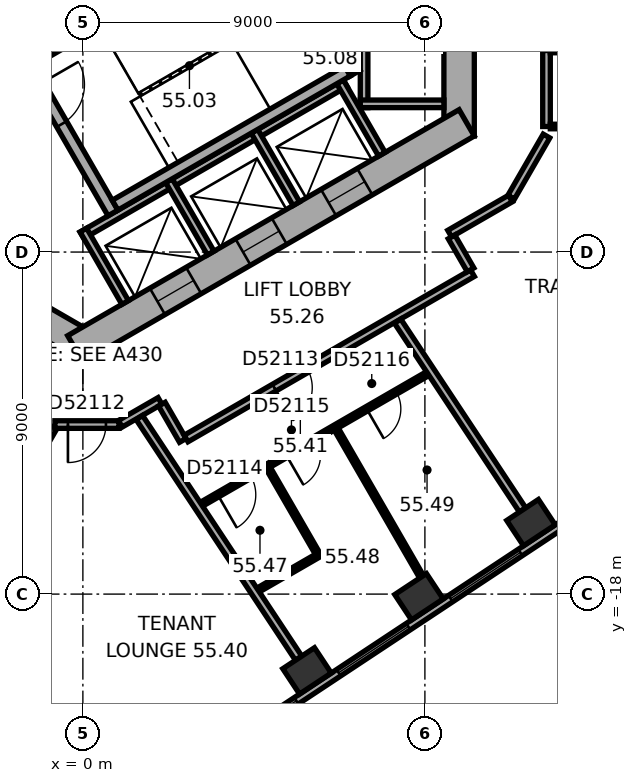
"""IFC4 building model, lengths in metres.
Left out: names, types, materials, properties, quantities, classifications, styles, units other than length and angle.
Written with IfcOpenShell. Run it as: python <this file> out.ifc"""

import sys

from ifc_helpers import new_model, si_unit, direction, frame, frame_2d, origin, origin_2d, place, context, subcontext, project, spatial, rectangle, extrude, element, fill, save


model = new_model("IFC4")
c1 = context("Model", 3, precision=1e-05, world=origin(), true_north=direction((0.0, 1.0)))
c2 = subcontext(c1, "Body", "Model", "MODEL_VIEW")
j1 = project(units=[si_unit("LENGTHUNIT", "METRE"), si_unit("PLANEANGLEUNIT", "RADIAN")], contexts=[c1])
p1 = place(None, origin())
s1 = spatial("IfcSite", under=j1, at=p1, CompositionType="ELEMENT")
p2 = place(p1, origin())
s2 = spatial("IfcBuilding", under=s1, at=p2, CompositionType="ELEMENT")
p3 = place(p2, frame((0.0, 0.0, 225.4)))
s3 = spatial("IfcBuildingStorey", under=s2, at=p3, CompositionType="ELEMENT", Elevation=225.4)
for number, where, z_axis, x_axis in (
    (1, (5.898, -20.021, 0.0), (0.0, 0.0, 1.0), (0.834, 0.552, 0.0)),
    (2, (8.844, -18.07, 0.0), (0.0, 0.0, 1.0), (0.834, 0.552, 0.0)),
    (3, (11.791, -16.12, 0.0), (0.0, 0.0, 1.0), (0.834, 0.552, 0.0)),
):
    element("IfcColumn", number, at=place(p3, frame(where, z_axis=z_axis, x_axis=x_axis)), inside=s3, PredefinedType="COLUMN", context=c2, shape_type="SweptSolid", body=[
        extrude(rectangle(XDim=1.0, YDim=0.8, at=origin_2d()), origin(), (0.0, 0.0, 1.0), 3.7),
    ])
p4 = place(p3, frame((9.9, -5.947, 0.0), z_axis=(0.0, 0.0, 1.0), x_axis=(0.0, 1.0, 0.0)))
e4 = element("IfcWall", 4, at=p4, inside=s3, PredefinedType="SHEAR", context=c2, shape_type="SweptSolid", body=[
    extrude(rectangle(XDim=11.894, YDim=0.8, at=frame_2d((5.947, 0.0))), origin(), (0.0, 0.0, 1.0), 3.7),
])
p5 = place(p4, frame((6.147, 0.0, 0.0)))
e5 = element("IfcOpeningElement", 5, at=p5, cuts=e4, PredefinedType="OPENING", context=c2, shape_type="SweptSolid", body=[
    extrude(rectangle(XDim=1.5, YDim=2.1, at=frame_2d((0.75, 1.05))), frame((0.0, 0.41, 0.0), z_axis=(0.0, -1.0, 0.0), x_axis=(1.0, 0.0, 0.0)), (0.0, 0.0, 1.0), 0.82),
])
p6 = place(p4, frame((2.997, 0.0, 0.0)))
e6 = element("IfcOpeningElement", 6, at=p6, cuts=e4, PredefinedType="OPENING", context=c2, shape_type="SweptSolid", body=[
    extrude(rectangle(XDim=0.9, YDim=2.1, at=frame_2d((0.45, 1.05))), frame((0.0, 0.41, 0.0), z_axis=(0.0, -1.0, 0.0), x_axis=(1.0, 0.0, 0.0)), (0.0, 0.0, 1.0), 0.82),
])
p7 = place(p3, frame((-10.1, -5.6, 0.0), z_axis=(0.0, 0.0, 1.0), x_axis=(0.866023897231, -0.500002609418, 0.0)))
e7 = element("IfcWall", 7, at=p7, inside=s3, PredefinedType="SHEAR", context=c2, shape_type="SweptSolid", body=[
    extrude(rectangle(XDim=11.894, YDim=0.8, at=frame_2d((5.947, 0.0))), origin(), (0.0, 0.0, 1.0), 3.7),
])
p8 = place(p7, frame((6.147, 0.0, 0.0)))
e8 = element("IfcOpeningElement", 8, at=p8, cuts=e7, PredefinedType="OPENING", context=c2, shape_type="SweptSolid", body=[
    extrude(rectangle(XDim=1.5, YDim=2.1, at=frame_2d((0.75, 1.05))), frame((0.0, 0.41, 0.0), z_axis=(0.0, -1.0, 0.0), x_axis=(1.0, 0.0, 0.0)), (0.0, 0.0, 1.0), 0.82),
])
p9 = place(p7, frame((1.597, 0.0, 0.0)))
e9 = element("IfcOpeningElement", 9, at=p9, cuts=e7, PredefinedType="OPENING", context=c2, shape_type="SweptSolid", body=[
    extrude(rectangle(XDim=1.1, YDim=2.1, at=frame_2d((0.55, 1.05))), frame((0.0, 0.41, 0.0), z_axis=(0.0, -1.0, 0.0), x_axis=(1.0, 0.0, 0.0)), (0.0, 0.0, 1.0), 0.82),
])
p10 = place(p7, frame((4.197, 0.0, 0.0)))
e10 = element("IfcOpeningElement", 10, at=p10, cuts=e7, PredefinedType="OPENING", context=c2, shape_type="SweptSolid", body=[
    extrude(rectangle(XDim=1.1, YDim=2.1, at=frame_2d((0.55, 1.05))), frame((0.0, 0.41, 0.0), z_axis=(0.0, -1.0, 0.0), x_axis=(1.0, 0.0, 0.0)), (0.0, 0.0, 1.0), 0.82),
])
p11 = place(p3, frame((-0.2, -11.547, 0.0), z_axis=(0.0, 0.0, 1.0), x_axis=(0.866023897231, 0.500002609418, 0.0)))
e11 = element("IfcWall", 11, at=p11, inside=s3, PredefinedType="SHEAR", context=c2, shape_type="SweptSolid", body=[
    extrude(rectangle(XDim=11.894, YDim=0.8, at=frame_2d((5.947, 0.0))), origin(), (0.0, 0.0, 1.0), 3.7),
])
p12 = place(p11, frame((2.497, 0.0, 0.0)))
e12 = element("IfcOpeningElement", 12, at=p12, cuts=e11, PredefinedType="OPENING", context=c2, shape_type="SweptSolid", body=[
    extrude(rectangle(XDim=1.1, YDim=2.1, at=frame_2d((0.55, 1.05))), frame((0.0, 0.41, 0.0), z_axis=(0.0, -1.0, 0.0), x_axis=(1.0, 0.0, 0.0)), (0.0, 0.0, 1.0), 0.82),
])
p13 = place(p11, frame((5.097, 0.0, 0.0)))
e13 = element("IfcOpeningElement", 13, at=p13, cuts=e11, PredefinedType="OPENING", context=c2, shape_type="SweptSolid", body=[
    extrude(rectangle(XDim=1.1, YDim=2.1, at=frame_2d((0.55, 1.05))), frame((0.0, 0.41, 0.0), z_axis=(0.0, -1.0, 0.0), x_axis=(1.0, 0.0, 0.0)), (0.0, 0.0, 1.0), 0.82),
])
p14 = place(p11, frame((7.697, 0.0, 0.0)))
e14 = element("IfcOpeningElement", 14, at=p14, cuts=e11, PredefinedType="OPENING", context=c2, shape_type="SweptSolid", body=[
    extrude(rectangle(XDim=1.1, YDim=2.1, at=frame_2d((0.55, 1.05))), frame((0.0, 0.41, 0.0), z_axis=(0.0, -1.0, 0.0), x_axis=(1.0, 0.0, 0.0)), (0.0, 0.0, 1.0), 0.82),
])
p15 = place(p3, frame((2.739, -22.711, 0.0), z_axis=(0.0, 0.0, 1.0), x_axis=(0.833885723098, 0.551937134838, 0.0)))
e15 = element("IfcWall", 15, at=p15, inside=s3, PredefinedType="STANDARD", context=c2, shape_type="SweptSolid", body=[
    extrude(rectangle(XDim=18.841, YDim=0.2, at=frame_2d((9.421, 0.0))), origin(), (0.0, 0.0, 1.0), 3.7),
])
p16 = place(p15, frame((1.252, 0.0, 0.9)))
e16 = element("IfcOpeningElement", 16, at=p16, cuts=e15, PredefinedType="OPENING", context=c2, shape_type="SweptSolid", body=[
    extrude(rectangle(XDim=2.2, YDim=2.0, at=frame_2d((1.1, 1.0))), frame((0.0, 0.11, 0.0), z_axis=(0.0, -1.0, 0.0), x_axis=(1.0, 0.0, 0.0)), (0.0, 0.0, 1.0), 0.22),
])
p17 = place(p15, frame((4.786, 0.0, 0.9)))
e17 = element("IfcOpeningElement", 17, at=p17, cuts=e15, PredefinedType="OPENING", context=c2, shape_type="SweptSolid", body=[
    extrude(rectangle(XDim=2.2, YDim=2.0, at=frame_2d((1.1, 1.0))), frame((0.0, 0.11, 0.0), z_axis=(0.0, -1.0, 0.0), x_axis=(1.0, 0.0, 0.0)), (0.0, 0.0, 1.0), 0.22),
])
p18 = place(p15, frame((8.32, 0.0, 0.9)))
e18 = element("IfcOpeningElement", 18, at=p18, cuts=e15, PredefinedType="OPENING", context=c2, shape_type="SweptSolid", body=[
    extrude(rectangle(XDim=2.2, YDim=2.0, at=frame_2d((1.1, 1.0))), frame((0.0, 0.11, 0.0), z_axis=(0.0, -1.0, 0.0), x_axis=(1.0, 0.0, 0.0)), (0.0, 0.0, 1.0), 0.22),
])
p19 = place(p15, frame((11.854, 0.0, 0.9)))
e19 = element("IfcOpeningElement", 19, at=p19, cuts=e15, PredefinedType="OPENING", context=c2, shape_type="SweptSolid", body=[
    extrude(rectangle(XDim=2.2, YDim=2.0, at=frame_2d((1.1, 1.0))), frame((0.0, 0.11, 0.0), z_axis=(0.0, -1.0, 0.0), x_axis=(1.0, 0.0, 0.0)), (0.0, 0.0, 1.0), 0.22),
])
p20 = place(p15, frame((15.387, 0.0, 0.9)))
e20 = element("IfcOpeningElement", 20, at=p20, cuts=e15, PredefinedType="OPENING", context=c2, shape_type="SweptSolid", body=[
    extrude(rectangle(XDim=2.2, YDim=2.0, at=frame_2d((1.1, 1.0))), frame((0.0, 0.11, 0.0), z_axis=(0.0, -1.0, 0.0), x_axis=(1.0, 0.0, 0.0)), (0.0, 0.0, 1.0), 0.22),
])
p21 = place(p3, frame((7.4, -5.2, 0.0), z_axis=(0.0, 0.0, 1.0), x_axis=(0.0, 1.0, 0.0)))
e21 = element("IfcWall", 21, at=p21, inside=s3, PredefinedType="PARTITIONING", context=c2, shape_type="SweptSolid", body=[
    extrude(rectangle(XDim=5.4, YDim=0.2, at=frame_2d((2.7, 0.0))), origin(), (0.0, 0.0, 1.0), 3.42),
])
p22 = place(p3, frame((7.3, -5.1, 0.0), z_axis=(0.0, 0.0, 1.0), x_axis=(1.0, 0.0, 0.0)))
e22 = element("IfcWall", 22, at=p22, inside=s3, PredefinedType="PARTITIONING", context=c2, shape_type="SweptSolid", body=[
    extrude(rectangle(XDim=2.2, YDim=0.2, at=frame_2d((1.1, 0.0))), origin(), (0.0, 0.0, 1.0), 3.42),
])
p23 = place(p3, frame((-0.024, -8.559, 0.0), z_axis=(0.0, 0.0, 1.0), x_axis=(0.866026010844, 0.49999894854, 0.0)))
e23 = element("IfcWall", 23, at=p23, inside=s3, PredefinedType="PARTITIONING", context=c2, shape_type="SweptSolid", body=[
    extrude(rectangle(XDim=8.0, YDim=0.2, at=frame_2d((4.0, 0.0))), origin(), (0.0, 0.0, 1.0), 3.42),
])
for number, where, z_axis, x_axis in (
    (24, (0.013, -8.422, 0.0), (0.0, 0.0, 1.0), (0.5, -0.866, 0.0)),
    (25, (2.264, -7.122, 0.0), (0.0, 0.0, 1.0), (0.5, -0.866, 0.0)),
    (26, (4.516, -5.822, 0.0), (0.0, 0.0, 1.0), (0.5, -0.866, 0.0)),
    (27, (6.768, -4.522, 0.0), (0.0, 0.0, 1.0), (0.5, -0.866, 0.0)),
):
    element("IfcWall", number, at=place(p3, frame(where, z_axis=z_axis, x_axis=x_axis)), inside=s3, PredefinedType="PARTITIONING", context=c2, shape_type="SweptSolid", body=[
        extrude(rectangle(XDim=2.2, YDim=0.2, at=frame_2d((1.1, 0.0))), origin(), (0.0, 0.0, 1.0), 3.42),
    ])
p24 = place(p3, frame((-1.558, -3.902, 0.0), z_axis=(0.0, 0.0, 1.0), x_axis=(0.499977259774, -0.866038532462, 0.0)))
e28 = element("IfcWall", 28, at=p24, inside=s3, PredefinedType="SHEAR", context=c2, shape_type="SweptSolid", body=[
    extrude(rectangle(XDim=4.7, YDim=0.3, at=frame_2d((2.35, 0.0))), origin(), (0.0, 0.0, 1.0), 3.42),
])
p25 = place(p24, frame((0.8, 0.0, 0.0)))
e29 = element("IfcOpeningElement", 29, at=p25, cuts=e28, PredefinedType="OPENING", context=c2, shape_type="SweptSolid", body=[
    extrude(rectangle(XDim=1.2, YDim=2.1, at=frame_2d((0.6, 1.05))), frame((0.0, 0.16, 0.0), z_axis=(0.0, -1.0, 0.0), x_axis=(1.0, 0.0, 0.0)), (0.0, 0.0, 1.0), 0.32),
])
p26 = place(p3, frame((4.816, -0.222, 0.0), z_axis=(0.0, 0.0, 1.0), x_axis=(0.499977259774, -0.866038532462, 0.0)))
e30 = element("IfcWall", 30, at=p26, inside=s3, PredefinedType="SHEAR", context=c2, shape_type="SweptSolid", body=[
    extrude(rectangle(XDim=4.7, YDim=0.3, at=frame_2d((2.35, 0.0))), origin(), (0.0, 0.0, 1.0), 3.42),
])
for number, where, z_axis, x_axis in (
    (31, (-1.353, -3.957, 0.0), (0.0, 0.0, 1.0), (0.866, 0.5, 0.0)),
    (32, (0.847, -7.767, 0.0), (0.0, 0.0, 1.0), (0.866, 0.5, 0.0)),
):
    element("IfcWall", number, at=place(p3, frame(where, z_axis=z_axis, x_axis=x_axis)), inside=s3, PredefinedType="SHEAR", context=c2, shape_type="SweptSolid", body=[
        extrude(rectangle(XDim=7.06, YDim=0.3, at=frame_2d((3.53, 0.0))), origin(), (0.0, 0.0, 1.0), 3.42),
    ])
p27 = place(p3, frame((-4.465, -19.997, 0.0), z_axis=(0.0, 0.0, 1.0), x_axis=(0.500011802906, 0.866018589266, 0.0)))
e33 = element("IfcWall", 33, at=p27, inside=s3, PredefinedType="PARTITIONING", context=c2, shape_type="SweptSolid", body=[
    extrude(rectangle(XDim=7.377, YDim=0.2, at=frame_2d((3.688, 0.0))), origin(), (0.0, 0.0, 1.0), 3.42),
])
p28 = place(p3, frame((-0.736, -13.539, 0.0), z_axis=(0.0, 0.0, 1.0), x_axis=(1.0, 0.0, 0.0)))
e34 = element("IfcWall", 34, at=p28, inside=s3, PredefinedType="PARTITIONING", context=c2, shape_type="SweptSolid", body=[
    extrude(rectangle(XDim=1.686, YDim=0.2, at=frame_2d((0.843, 0.0))), origin(), (0.0, 0.0, 1.0), 3.42),
])
p29 = place(p28, frame((0.343, 0.0, 0.0)))
e35 = element("IfcOpeningElement", 35, at=p29, cuts=e34, PredefinedType="OPENING", context=c2, shape_type="SweptSolid", body=[
    extrude(rectangle(XDim=1.0, YDim=2.1, at=frame_2d((0.5, 1.05))), frame((0.0, 0.11, 0.0), z_axis=(0.0, -1.0, 0.0), x_axis=(1.0, 0.0, 0.0)), (0.0, 0.0, 1.0), 0.22),
])
p30 = place(p3, frame((0.985, -13.519, 0.0), z_axis=(0.0, 0.0, 1.0), x_axis=(0.866054082991, 0.499950322867, 0.0)))
e36 = element("IfcWall", 36, at=p30, inside=s3, PredefinedType="PARTITIONING", context=c2, shape_type="SweptSolid", body=[
    extrude(rectangle(XDim=1.206, YDim=0.2, at=frame_2d((0.603, 0.0))), origin(), (0.0, 0.0, 1.0), 3.42),
])
p31 = place(p3, frame((2.079, -13.003, 0.0), z_axis=(0.0, 0.0, 1.0), x_axis=(0.500074377092, -0.865982457891, 0.0)))
e37 = element("IfcWall", 37, at=p31, inside=s3, PredefinedType="PARTITIONING", context=c2, shape_type="SweptSolid", body=[
    extrude(rectangle(XDim=1.101, YDim=0.2, at=frame_2d((0.55, 0.0))), origin(), (0.0, 0.0, 1.0), 3.42),
])
p32 = place(p3, frame((2.716, -13.906, 0.0), z_axis=(0.0, 0.0, 1.0), x_axis=(0.866040290674, 0.499974214264, 0.0)))
e38 = element("IfcWall", 38, at=p32, inside=s3, PredefinedType="PARTITIONING", context=c2, shape_type="SweptSolid", body=[
    extrude(rectangle(XDim=8.702, YDim=0.2, at=frame_2d((4.351, 0.0))), origin(), (0.0, 0.0, 1.0), 3.42),
])
p33 = place(p32, frame((2.679, 0.0, 0.0)))
e39 = element("IfcOpeningElement", 39, at=p33, cuts=e38, PredefinedType="OPENING", context=c2, shape_type="SweptSolid", body=[
    extrude(rectangle(XDim=1.0, YDim=2.1, at=frame_2d((0.5, 1.05))), frame((0.0, 0.11, 0.0), z_axis=(0.0, -1.0, 0.0), x_axis=(1.0, 0.0, 0.0)), (0.0, 0.0, 1.0), 0.22),
])
p34 = place(p3, frame((3.117, -15.638, 0.0), z_axis=(0.0, 0.0, 1.0), x_axis=(0.866031365477, 0.499989673903, 0.0)))
e40 = element("IfcWall", 40, at=p34, inside=s3, PredefinedType="PARTITIONING", context=c2, shape_type="SweptSolid", body=[
    extrude(rectangle(XDim=6.881, YDim=0.12, at=frame_2d((3.44, 0.0))), origin(), (0.0, 0.0, 1.0), 3.42),
])
p35 = place(p34, frame((0.5, 0.0, 0.0)))
e41 = element("IfcOpeningElement", 41, at=p35, cuts=e40, PredefinedType="OPENING", context=c2, shape_type="SweptSolid", body=[
    extrude(rectangle(XDim=1.0, YDim=2.1, at=frame_2d((0.5, 1.05))), frame((0.0, 0.07, 0.0), z_axis=(0.0, -1.0, 0.0), x_axis=(1.0, 0.0, 0.0)), (0.0, 0.0, 1.0), 0.14),
])
p36 = place(p34, frame((2.583, 0.0, 0.0)))
e42 = element("IfcOpeningElement", 42, at=p36, cuts=e40, PredefinedType="OPENING", context=c2, shape_type="SweptSolid", body=[
    extrude(rectangle(XDim=0.9, YDim=2.1, at=frame_2d((0.45, 1.05))), frame((0.0, 0.07, 0.0), z_axis=(0.0, -1.0, 0.0), x_axis=(1.0, 0.0, 0.0)), (0.0, 0.0, 1.0), 0.14),
])
p37 = place(p34, frame((5.023, 0.0, 0.0)))
e43 = element("IfcOpeningElement", 43, at=p37, cuts=e40, PredefinedType="OPENING", context=c2, shape_type="SweptSolid", body=[
    extrude(rectangle(XDim=0.9, YDim=2.1, at=frame_2d((0.45, 1.05))), frame((0.0, 0.07, 0.0), z_axis=(0.0, -1.0, 0.0), x_axis=(1.0, 0.0, 0.0)), (0.0, 0.0, 1.0), 0.14),
])
p38 = place(p3, frame((4.61, -17.893, 0.0), z_axis=(0.0, 0.0, 1.0), x_axis=(0.866023842607, 0.500002704028, 0.0)))
e44 = element("IfcWall", 44, at=p38, inside=s3, PredefinedType="PARTITIONING", context=c2, shape_type="SweptSolid", body=[
    extrude(rectangle(XDim=1.835, YDim=0.12, at=frame_2d((0.917, 0.0))), origin(), (0.0, 0.0, 1.0), 3.42),
])
p39 = place(p3, frame((5.677, -19.687, 0.0), z_axis=(0.0, 0.0, 1.0), x_axis=(-0.551936619203, 0.833886064389, 0.0)))
e45 = element("IfcWall", 45, at=p39, inside=s3, PredefinedType="PARTITIONING", context=c2, shape_type="SweptSolid", body=[
    extrude(rectangle(XDim=7.592, YDim=0.2, at=frame_2d((3.796, 0.0))), origin(), (0.0, 0.0, 1.0), 3.42),
])
p40 = place(p3, frame((6.169, -16.924, 0.0), z_axis=(0.0, 0.0, 1.0), x_axis=(-0.500047388771, 0.865998042136, 0.0)))
e46 = element("IfcWall", 46, at=p40, inside=s3, PredefinedType="PARTITIONING", context=c2, shape_type="SweptSolid", body=[
    extrude(rectangle(XDim=2.58, YDim=0.12, at=frame_2d((1.29, 0.0))), origin(), (0.0, 0.0, 1.0), 3.42),
])
p41 = place(p3, frame((8.912, -17.545, 0.0), z_axis=(0.0, 0.0, 1.0), x_axis=(-0.500022113525, 0.866012636158, 0.0)))
e47 = element("IfcWall", 47, at=p41, inside=s3, PredefinedType="PARTITIONING", context=c2, shape_type="SweptSolid", body=[
    extrude(rectangle(XDim=4.49, YDim=0.12, at=frame_2d((2.245, 0.0))), origin(), (0.0, 0.0, 1.0), 2.87),
])
p42 = place(p3, frame((9.652, -8.515, 0.0), z_axis=(0.0, 0.0, 1.0), x_axis=(0.866020375458, 0.500008709215, 0.0)))
e48 = element("IfcWall", 48, at=p42, inside=s3, PredefinedType="PARTITIONING", context=c2, shape_type="SweptSolid", body=[
    extrude(rectangle(XDim=1.846, YDim=0.2, at=frame_2d((0.923, 0.0))), origin(), (0.0, 0.0, 1.0), 3.42),
])
p43 = place(p3, frame((10.202, -9.469, 0.0), z_axis=(0.0, 0.0, 1.0), x_axis=(-0.499968756647, 0.866043441391, 0.0)))
e49 = element("IfcWall", 49, at=p43, inside=s3, PredefinedType="PARTITIONING", context=c2, shape_type="SweptSolid", body=[
    extrude(rectangle(XDim=1.001, YDim=0.2, at=frame_2d((0.5, 0.0))), origin(), (0.0, 0.0, 1.0), 3.42),
])
p44 = place(p3, frame((11.27, -7.558, 0.0), z_axis=(0.0, 0.0, 1.0), x_axis=(0.499964847546, 0.866045698112, 0.0)))
e50 = element("IfcWall", 50, at=p44, inside=s3, PredefinedType="PARTITIONING", context=c2, shape_type="SweptSolid", body=[
    extrude(rectangle(XDim=1.86, YDim=0.2, at=frame_2d((0.93, 0.0))), origin(), (0.0, 0.0, 1.0), 3.42),
])
p45 = place(p3, frame((11.571, -15.786, 0.0), z_axis=(0.0, 0.0, 1.0), x_axis=(-0.551944861763, 0.833880608705, 0.0)))
e51 = element("IfcWall", 51, at=p45, inside=s3, PredefinedType="PARTITIONING", context=c2, shape_type="SweptSolid", body=[
    extrude(rectangle(XDim=5.957, YDim=0.2, at=frame_2d((2.979, 0.0))), origin(), (0.0, 0.0, 1.0), 3.42),
])
p46 = place(p3, frame((12.2, -5.697, 0.0), z_axis=(0.0, 0.0, 1.0), x_axis=(0.0, 1.0, 0.0)))
e52 = element("IfcWall", 52, at=p46, inside=s3, PredefinedType="PARTITIONING", context=c2, shape_type="SweptSolid", body=[
    extrude(rectangle(XDim=2.0, YDim=0.2, at=frame_2d((1.0, 0.0))), origin(), (0.0, 0.0, 1.0), 3.42),
])
p47 = place(p3, frame((12.3, -3.697, 0.0), z_axis=(0.0, 0.0, 1.0), x_axis=(1.0, 0.0, 0.0)))
e53 = element("IfcWall", 53, at=p47, inside=s3, PredefinedType="PARTITIONING", context=c2, shape_type="SweptSolid", body=[
    extrude(rectangle(XDim=2.3, YDim=0.12, at=frame_2d((1.15, 0.0))), origin(), (0.0, 0.0, 1.0), 3.42),
])
p48 = place(p3, frame((14.6, -5.697, 0.0), z_axis=(0.0, 0.0, 1.0), x_axis=(-1.0, 0.0, 0.0)))
e54 = element("IfcWall", 54, at=p48, inside=s3, PredefinedType="PARTITIONING", context=c2, shape_type="SweptSolid", body=[
    extrude(rectangle(XDim=2.3, YDim=0.12, at=frame_2d((1.15, 0.0))), origin(), (0.0, 0.0, 1.0), 3.42),
])
p49 = place(p48, frame((0.7, 0.0, 0.0)))
e55 = element("IfcOpeningElement", 55, at=p49, cuts=e54, PredefinedType="OPENING", context=c2, shape_type="SweptSolid", body=[
    extrude(rectangle(XDim=0.9, YDim=2.1, at=frame_2d((0.45, 1.05))), frame((0.0, 0.07, 0.0), z_axis=(0.0, -1.0, 0.0), x_axis=(1.0, 0.0, 0.0)), (0.0, 0.0, 1.0), 0.14),
])
p50 = place(p16, origin())
e56 = element("IfcWindow", 56, at=p50, inside=s3, PartitioningType="SINGLE_PANEL", PredefinedType="WINDOW", context=c2, shape_type="SweptSolid", body=[
    extrude(rectangle(XDim=2.2, YDim=2.0, at=frame_2d((1.1, 1.0))), frame((0.0, 0.03, 0.0), z_axis=(0.0, -1.0, 0.0), x_axis=(1.0, 0.0, 0.0)), (0.0, 0.0, 1.0), 0.06),
])
fill(e16, e56)
p51 = place(p17, origin())
e57 = element("IfcWindow", 57, at=p51, inside=s3, PartitioningType="SINGLE_PANEL", PredefinedType="WINDOW", context=c2, shape_type="SweptSolid", body=[
    extrude(rectangle(XDim=2.2, YDim=2.0, at=frame_2d((1.1, 1.0))), frame((0.0, 0.03, 0.0), z_axis=(0.0, -1.0, 0.0), x_axis=(1.0, 0.0, 0.0)), (0.0, 0.0, 1.0), 0.06),
])
fill(e17, e57)
p52 = place(p18, origin())
e58 = element("IfcWindow", 58, at=p52, inside=s3, PartitioningType="SINGLE_PANEL", PredefinedType="WINDOW", context=c2, shape_type="SweptSolid", body=[
    extrude(rectangle(XDim=2.2, YDim=2.0, at=frame_2d((1.1, 1.0))), frame((0.0, 0.03, 0.0), z_axis=(0.0, -1.0, 0.0), x_axis=(1.0, 0.0, 0.0)), (0.0, 0.0, 1.0), 0.06),
])
fill(e18, e58)
p53 = place(p25, origin())
e59 = element("IfcDoor", 59, at=p53, inside=s3, OperationType="SINGLE_SWING_RIGHT", PredefinedType="DOOR", context=c2, shape_type="SweptSolid", body=[
    extrude(rectangle(XDim=1.2, YDim=2.1, at=frame_2d((0.6, 1.05))), frame((0.0, 0.025, 0.0), z_axis=(0.0, -1.0, 0.0), x_axis=(1.0, 0.0, 0.0)), (0.0, 0.0, 1.0), 0.05),
])
fill(e29, e59)
p54 = place(p12, origin())
e60 = element("IfcDoor", 60, at=p54, inside=s3, OperationType="DOUBLE_DOOR_SLIDING", PredefinedType="DOOR", context=c2, shape_type="SweptSolid", body=[
    extrude(rectangle(XDim=1.1, YDim=2.1, at=frame_2d((0.55, 1.05))), frame((0.0, 0.025, 0.0), z_axis=(0.0, -1.0, 0.0), x_axis=(1.0, 0.0, 0.0)), (0.0, 0.0, 1.0), 0.05),
])
fill(e12, e60)
p55 = place(p13, origin())
e61 = element("IfcDoor", 61, at=p55, inside=s3, OperationType="DOUBLE_DOOR_SLIDING", PredefinedType="DOOR", context=c2, shape_type="SweptSolid", body=[
    extrude(rectangle(XDim=1.1, YDim=2.1, at=frame_2d((0.55, 1.05))), frame((0.0, 0.025, 0.0), z_axis=(0.0, -1.0, 0.0), x_axis=(1.0, 0.0, 0.0)), (0.0, 0.0, 1.0), 0.05),
])
fill(e13, e61)
p56 = place(p14, origin())
e62 = element("IfcDoor", 62, at=p56, inside=s3, OperationType="DOUBLE_DOOR_SLIDING", PredefinedType="DOOR", context=c2, shape_type="SweptSolid", body=[
    extrude(rectangle(XDim=1.1, YDim=2.1, at=frame_2d((0.55, 1.05))), frame((0.0, 0.025, 0.0), z_axis=(0.0, -1.0, 0.0), x_axis=(1.0, 0.0, 0.0)), (0.0, 0.0, 1.0), 0.05),
])
fill(e14, e62)
p57 = place(p29, origin())
e63 = element("IfcDoor", 63, at=p57, inside=s3, OperationType="SINGLE_SWING_LEFT", PredefinedType="DOOR", context=c2, shape_type="SweptSolid", body=[
    extrude(rectangle(XDim=1.0, YDim=2.1, at=frame_2d((0.5, 1.05))), frame((0.0, 0.025, 0.0), z_axis=(0.0, -1.0, 0.0), x_axis=(1.0, 0.0, 0.0)), (0.0, 0.0, 1.0), 0.05),
])
fill(e35, e63)
p58 = place(p33, origin())
e64 = element("IfcDoor", 64, at=p58, inside=s3, OperationType="SINGLE_SWING_LEFT", PredefinedType="DOOR", context=c2, shape_type="SweptSolid", body=[
    extrude(rectangle(XDim=1.0, YDim=2.1, at=frame_2d((0.5, 1.05))), frame((0.0, 0.025, 0.0), z_axis=(0.0, -1.0, 0.0), x_axis=(1.0, 0.0, 0.0)), (0.0, 0.0, 1.0), 0.05),
])
fill(e39, e64)
p59 = place(p35, origin())
e65 = element("IfcDoor", 65, at=p59, inside=s3, OperationType="SINGLE_SWING_LEFT", PredefinedType="DOOR", context=c2, shape_type="SweptSolid", body=[
    extrude(rectangle(XDim=1.0, YDim=2.1, at=frame_2d((0.5, 1.05))), frame((0.0, 0.025, 0.0), z_axis=(0.0, -1.0, 0.0), x_axis=(1.0, 0.0, 0.0)), (0.0, 0.0, 1.0), 0.05),
])
fill(e41, e65)
p60 = place(p36, origin())
e66 = element("IfcDoor", 66, at=p60, inside=s3, OperationType="SINGLE_SWING_LEFT", PredefinedType="DOOR", context=c2, shape_type="SweptSolid", body=[
    extrude(rectangle(XDim=0.9, YDim=2.1, at=frame_2d((0.45, 1.05))), frame((0.0, 0.025, 0.0), z_axis=(0.0, -1.0, 0.0), x_axis=(1.0, 0.0, 0.0)), (0.0, 0.0, 1.0), 0.05),
])
fill(e42, e66)
p61 = place(p37, origin())
e67 = element("IfcDoor", 67, at=p61, inside=s3, OperationType="SINGLE_SWING_LEFT", PredefinedType="DOOR", context=c2, shape_type="SweptSolid", body=[
    extrude(rectangle(XDim=0.9, YDim=2.1, at=frame_2d((0.45, 1.05))), frame((0.0, 0.025, 0.0), z_axis=(0.0, -1.0, 0.0), x_axis=(1.0, 0.0, 0.0)), (0.0, 0.0, 1.0), 0.05),
])
fill(e43, e67)
save(model, sys.argv[1])
